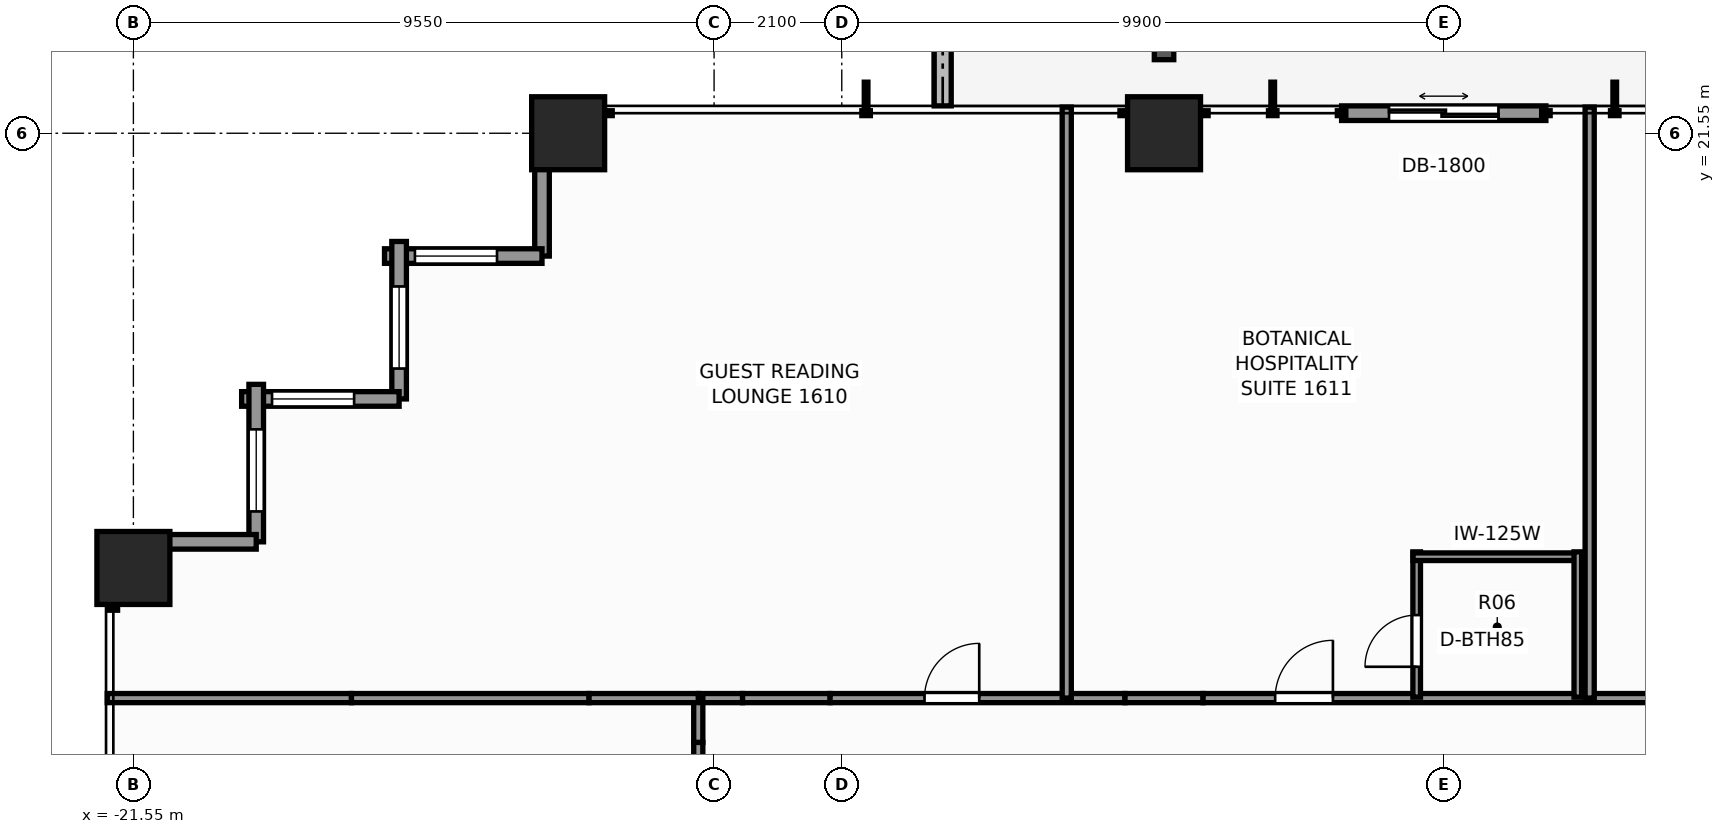
"""IFC4 building model, lengths in metres.
Left out: names, types, materials, properties, quantities, classifications, styles, units other than length and angle.
Written with IfcOpenShell. Run it as: python <this file> out.ifc"""

import sys

from ifc_helpers import new_model, si_unit, direction, frame, frame_2d, origin, origin_2d, place, context, subcontext, project, spatial, rectangle, extrude, element, fill, save


model = new_model("IFC4")
c1 = context("Model", 3, precision=1e-05, world=origin(), true_north=direction((0.0, 1.0)))
c2 = subcontext(c1, "Body", "Model", "MODEL_VIEW")
j1 = project(units=[si_unit("LENGTHUNIT", "METRE"), si_unit("PLANEANGLEUNIT", "RADIAN")], contexts=[c1])
p1 = place(None, origin())
s1 = spatial("IfcSite", under=j1, at=p1, CompositionType="ELEMENT")
p2 = place(p1, origin())
s2 = spatial("IfcBuilding", under=s1, at=p2, CompositionType="ELEMENT")
p3 = place(p2, frame((0.0, 0.0, 56.8)))
s3 = spatial("IfcBuildingStorey", under=s2, at=p3, CompositionType="ELEMENT", Elevation=56.8)
for number, where, z_axis, x_axis in (
    (1, (-14.4, 21.55, 0.0), (0.0, 0.0, 1.0), (1.0, 0.0, 0.0)),
    (2, (-4.6, 21.55, 0.0), (0.0, 0.0, 1.0), (1.0, 0.0, 0.0)),
    (3, (-21.55, 14.4, 0.0), (0.0, 0.0, 1.0), (1.0, 0.0, 0.0)),
):
    element("IfcColumn", number, at=place(p3, frame(where, z_axis=z_axis, x_axis=x_axis)), inside=s3, PredefinedType="COLUMN", context=c2, shape_type="SweptSolid", body=[
        extrude(rectangle(XDim=1.2, YDim=1.2, at=origin_2d()), origin(), (0.0, 0.0, 1.0), 3.3),
    ])
p4 = place(p3, frame((-8.24, 25.367, -0.06), z_axis=(0.0, 0.0, 1.0), x_axis=(0.0, -1.0, 0.0)))
e4 = element("IfcWall", 4, at=p4, inside=s3, PredefinedType="PARAPET", context=c2, shape_type="SweptSolid", body=[
    extrude(rectangle(XDim=3.367, YDim=0.28, at=frame_2d((1.684, 0.0))), origin(), (0.0, 0.0, 1.0), 0.42),
])
p5 = place(p3, frame((-1.68, 21.88, 0.0), z_axis=(0.0, 0.0, 1.0), x_axis=(1.0, 0.0, 0.0)))
e5 = element("IfcWall", 5, at=p5, inside=s3, PredefinedType="STANDARD", context=c2, shape_type="SweptSolid", body=[
    extrude(rectangle(XDim=3.36, YDim=0.24, at=frame_2d((1.68, 0.0))), origin(), (0.0, 0.0, 1.0), 3.06),
])
p6 = place(p5, frame((0.78, 0.0, 0.0)))
e6 = element("IfcOpeningElement", 6, at=p6, cuts=e5, PredefinedType="OPENING", context=c2, shape_type="SweptSolid", body=[
    extrude(rectangle(XDim=1.8, YDim=2.2, at=frame_2d((0.9, 1.1))), frame((0.0, 0.13, 0.0), z_axis=(0.0, -1.0, 0.0), x_axis=(1.0, 0.0, 0.0)), (0.0, 0.0, 1.0), 0.26),
])
p7 = place(p3, frame((-14.83, 19.53, 0.0), z_axis=(0.0, 0.0, 1.0), x_axis=(0.0, 1.0, 0.0)))
e7 = element("IfcWall", 7, at=p7, inside=s3, PredefinedType="STANDARD", context=c2, shape_type="SweptSolid", body=[
    extrude(rectangle(XDim=2.59, YDim=0.24, at=frame_2d((1.295, 0.0))), origin(), (0.0, 0.0, 1.0), 1.255),
])
p8 = place(p3, frame((-17.42, 19.53, 0.0), z_axis=(0.0, 0.0, 1.0), x_axis=(1.0, 0.0, 0.0)))
e8 = element("IfcWall", 8, at=p8, inside=s3, PredefinedType="STANDARD", context=c2, shape_type="SweptSolid", body=[
    extrude(rectangle(XDim=2.59, YDim=0.24, at=frame_2d((1.295, 0.0))), origin(), (0.0, 0.0, 1.0), 2.439),
])
p9 = place(p8, frame((0.5, 0.0, 0.65)))
e9 = element("IfcOpeningElement", 9, at=p9, cuts=e8, PredefinedType="OPENING", context=c2, shape_type="SweptSolid", body=[
    extrude(rectangle(XDim=1.35, YDim=1.55, at=frame_2d((0.675, 0.775))), frame((0.0, 0.13, 0.0), z_axis=(0.0, -1.0, 0.0), x_axis=(1.0, 0.0, 0.0)), (0.0, 0.0, 1.0), 0.26),
])
p10 = place(p3, frame((-17.18, 17.18, 0.0), z_axis=(0.0, 0.0, 1.0), x_axis=(0.0, 1.0, 0.0)))
e10 = element("IfcWall", 10, at=p10, inside=s3, PredefinedType="STANDARD", context=c2, shape_type="SweptSolid", body=[
    extrude(rectangle(XDim=2.59, YDim=0.24, at=frame_2d((1.295, 0.0))), origin(), (0.0, 0.0, 1.0), 2.439),
])
p11 = place(p10, frame((0.5, 0.0, 0.65)))
e11 = element("IfcOpeningElement", 11, at=p11, cuts=e10, PredefinedType="OPENING", context=c2, shape_type="SweptSolid", body=[
    extrude(rectangle(XDim=1.35, YDim=1.55, at=frame_2d((0.675, 0.775))), frame((0.0, 0.13, 0.0), z_axis=(0.0, -1.0, 0.0), x_axis=(1.0, 0.0, 0.0)), (0.0, 0.0, 1.0), 0.26),
])
p12 = place(p3, frame((-19.77, 17.18, 0.0), z_axis=(0.0, 0.0, 1.0), x_axis=(1.0, 0.0, 0.0)))
e12 = element("IfcWall", 12, at=p12, inside=s3, PredefinedType="STANDARD", context=c2, shape_type="SweptSolid", body=[
    extrude(rectangle(XDim=2.59, YDim=0.24, at=frame_2d((1.295, 0.0))), origin(), (0.0, 0.0, 1.0), 2.439),
])
p13 = place(p12, frame((0.5, 0.0, 0.65)))
e13 = element("IfcOpeningElement", 13, at=p13, cuts=e12, PredefinedType="OPENING", context=c2, shape_type="SweptSolid", body=[
    extrude(rectangle(XDim=1.35, YDim=1.55, at=frame_2d((0.675, 0.775))), frame((0.0, 0.13, 0.0), z_axis=(0.0, -1.0, 0.0), x_axis=(1.0, 0.0, 0.0)), (0.0, 0.0, 1.0), 0.26),
])
p14 = place(p3, frame((-19.53, 14.83, 0.0), z_axis=(0.0, 0.0, 1.0), x_axis=(0.0, 1.0, 0.0)))
e14 = element("IfcWall", 14, at=p14, inside=s3, PredefinedType="STANDARD", context=c2, shape_type="SweptSolid", body=[
    extrude(rectangle(XDim=2.59, YDim=0.24, at=frame_2d((1.295, 0.0))), origin(), (0.0, 0.0, 1.0), 2.439),
])
p15 = place(p14, frame((0.5, 0.0, 0.65)))
e15 = element("IfcOpeningElement", 15, at=p15, cuts=e14, PredefinedType="OPENING", context=c2, shape_type="SweptSolid", body=[
    extrude(rectangle(XDim=1.35, YDim=1.55, at=frame_2d((0.675, 0.775))), frame((0.0, 0.13, 0.0), z_axis=(0.0, -1.0, 0.0), x_axis=(1.0, 0.0, 0.0)), (0.0, 0.0, 1.0), 0.26),
])
p16 = place(p3, frame((-22.12, 14.83, 0.0), z_axis=(0.0, 0.0, 1.0), x_axis=(1.0, 0.0, 0.0)))
e16 = element("IfcWall", 16, at=p16, inside=s3, PredefinedType="STANDARD", context=c2, shape_type="SweptSolid", body=[
    extrude(rectangle(XDim=2.59, YDim=0.24, at=frame_2d((1.295, 0.0))), origin(), (0.0, 0.0, 1.0), 1.255),
])
p17 = place(p3, frame((-12.26, 12.26, 0.0), z_axis=(0.0, 0.0, 1.0), x_axis=(1.0, 0.0, 0.0)))
e17 = element("IfcWall", 17, at=p17, inside=s3, PredefinedType="PARTITIONING", context=c2, shape_type="SweptSolid", body=[
    extrude(rectangle(XDim=0.729, YDim=0.15, at=frame_2d((0.364, 0.0))), origin(), (0.0, 0.0, 1.0), 3.06),
])
p18 = place(p3, frame((-11.531, 12.26, 0.0), z_axis=(0.0, 0.0, 1.0), x_axis=(1.0, 0.0, 0.0)))
e18 = element("IfcWall", 18, at=p18, inside=s3, PredefinedType="PARTITIONING", context=c2, shape_type="SweptSolid", body=[
    extrude(rectangle(XDim=1.439, YDim=0.15, at=frame_2d((0.72, 0.0))), origin(), (0.0, 0.0, 1.0), 1.245),
])
p19 = place(p3, frame((-10.092, 12.26, 0.0), z_axis=(0.0, 0.0, 1.0), x_axis=(1.0, 0.0, 0.0)))
e19 = element("IfcWall", 19, at=p19, inside=s3, PredefinedType="PARTITIONING", context=c2, shape_type="SweptSolid", body=[
    extrude(rectangle(XDim=4.85, YDim=0.15, at=frame_2d((2.425, 0.0))), origin(), (0.0, 0.0, 1.0), 3.06),
])
p20 = place(p19, frame((1.552, 0.0, 0.0)))
e20 = element("IfcOpeningElement", 20, at=p20, cuts=e19, PredefinedType="OPENING", context=c2, shape_type="SweptSolid", body=[
    extrude(rectangle(XDim=0.9, YDim=2.06, at=frame_2d((0.45, 1.03))), frame((0.0, 0.085, 0.0), z_axis=(0.0, -1.0, 0.0), x_axis=(1.0, 0.0, 0.0)), (0.0, 0.0, 1.0), 0.17),
])
p21 = place(p3, frame((-5.242, 12.26, 0.0), z_axis=(0.0, 0.0, 1.0), x_axis=(1.0, 0.0, 0.0)))
e21 = element("IfcWall", 21, at=p21, inside=s3, PredefinedType="PARTITIONING", context=c2, shape_type="SweptSolid", body=[
    extrude(rectangle(XDim=1.284, YDim=0.15, at=frame_2d((0.642, 0.0))), origin(), (0.0, 0.0, 1.0), 1.245),
])
p22 = place(p3, frame((-3.958, 12.26, 0.0), z_axis=(0.0, 0.0, 1.0), x_axis=(1.0, 0.0, 0.0)))
e22 = element("IfcWall", 22, at=p22, inside=s3, PredefinedType="PARTITIONING", context=c2, shape_type="SweptSolid", body=[
    extrude(rectangle(XDim=7.916, YDim=0.15, at=frame_2d((3.958, 0.0))), origin(), (0.0, 0.0, 1.0), 2.585),
])
p23 = place(p22, frame((1.186, 0.0, 0.0)))
e23 = element("IfcOpeningElement", 23, at=p23, cuts=e22, PredefinedType="OPENING", context=c2, shape_type="SweptSolid", body=[
    extrude(rectangle(XDim=0.95, YDim=2.06, at=frame_2d((0.475, 1.03))), frame((0.0, 0.085, 0.0), z_axis=(0.0, -1.0, 0.0), x_axis=(1.0, 0.0, 0.0)), (0.0, 0.0, 1.0), 0.17),
])
p24 = place(p3, frame((-12.26, 10.092, 0.0), z_axis=(0.0, 0.0, 1.0), x_axis=(0.0, 1.0, 0.0)))
e24 = element("IfcWall", 24, at=p24, inside=s3, PredefinedType="PARTITIONING", context=c2, shape_type="SweptSolid", body=[
    extrude(rectangle(XDim=1.439, YDim=0.15, at=frame_2d((0.72, 0.0))), origin(), (0.0, 0.0, 1.0), 1.245),
])
p25 = place(p3, frame((-12.26, 11.531, 0.0), z_axis=(0.0, 0.0, 1.0), x_axis=(0.0, 1.0, 0.0)))
e25 = element("IfcWall", 25, at=p25, inside=s3, PredefinedType="PARTITIONING", context=c2, shape_type="SweptSolid", body=[
    extrude(rectangle(XDim=0.729, YDim=0.15, at=frame_2d((0.364, 0.0))), origin(), (0.0, 0.0, 1.0), 3.06),
])
p26 = place(p3, frame((-21.98, 12.26, 0.0), z_axis=(0.0, 0.0, 1.0), x_axis=(1.0, 0.0, 0.0)))
e26 = element("IfcWall", 26, at=p26, inside=s3, PredefinedType="PARTITIONING", context=c2, shape_type="SweptSolid", body=[
    extrude(rectangle(XDim=4.017, YDim=0.15, at=frame_2d((2.008, 0.0))), origin(), (0.0, 0.0, 1.0), 2.429),
])
p27 = place(p3, frame((-17.963, 12.26, 0.0), z_axis=(0.0, 0.0, 1.0), x_axis=(1.0, 0.0, 0.0)))
e27 = element("IfcWall", 27, at=p27, inside=s3, PredefinedType="PARTITIONING", context=c2, shape_type="SweptSolid", body=[
    extrude(rectangle(XDim=3.907, YDim=0.15, at=frame_2d((1.954, 0.0))), origin(), (0.0, 0.0, 1.0), 1.245),
])
p28 = place(p3, frame((-14.056, 12.26, 0.0), z_axis=(0.0, 0.0, 1.0), x_axis=(1.0, 0.0, 0.0)))
e28 = element("IfcWall", 28, at=p28, inside=s3, PredefinedType="PARTITIONING", context=c2, shape_type="SweptSolid", body=[
    extrude(rectangle(XDim=1.796, YDim=0.15, at=frame_2d((0.898, 0.0))), origin(), (0.0, 0.0, 1.0), 3.06),
])
for number, where, z_axis, x_axis in (
    (29, (-6.2, 12.26, 0.0), (0.0, 0.0, 1.0), (0.0, 1.0, 0.0)),
    (30, (2.4, 12.26, 0.0), (0.0, 0.0, 1.0), (0.0, 1.0, 0.0)),
):
    element("IfcWall", number, at=place(p3, frame(where, z_axis=z_axis, x_axis=x_axis)), inside=s3, PredefinedType="PARTITIONING", context=c2, shape_type="SweptSolid", body=[
        extrude(rectangle(XDim=9.72, YDim=0.15, at=frame_2d((4.86, 0.0))), origin(), (0.0, 0.0, 1.0), 2.429),
    ])
p29 = place(p3, frame((-0.445, 12.275, 0.0), z_axis=(0.0, 0.0, 1.0), x_axis=(0.0, 1.0, 0.0)))
e31 = element("IfcWall", 31, at=p29, inside=s3, PredefinedType="PARTITIONING", context=c2, shape_type="SweptSolid", body=[
    extrude(rectangle(XDim=2.39, YDim=0.125, at=frame_2d((1.195, 0.0))), origin(), (0.0, 0.0, 1.0), 3.06),
])
p30 = place(p29, frame((0.5, 0.0, 0.0)))
e32 = element("IfcOpeningElement", 32, at=p30, cuts=e31, PredefinedType="OPENING", context=c2, shape_type="SweptSolid", body=[
    extrude(rectangle(XDim=0.85, YDim=2.03, at=frame_2d((0.425, 1.015))), frame((0.0, 0.073, 0.0), z_axis=(0.0, -1.0, 0.0), x_axis=(1.0, 0.0, 0.0)), (0.0, 0.0, 1.0), 0.145),
])
p31 = place(p3, frame((-0.505, 14.585, 0.0), z_axis=(0.0, 0.0, 1.0), x_axis=(1.0, 0.0, 0.0)))
e33 = element("IfcWall", 33, at=p31, inside=s3, PredefinedType="PARTITIONING", context=c2, shape_type="SweptSolid", body=[
    extrude(rectangle(XDim=2.77, YDim=0.125, at=frame_2d((1.385, 0.0))), origin(), (0.0, 0.0, 1.0), 2.585),
])
p32 = place(p3, frame((2.205, 12.275, 0.0), z_axis=(0.0, 0.0, 1.0), x_axis=(0.0, 1.0, 0.0)))
e34 = element("IfcWall", 34, at=p32, inside=s3, PredefinedType="PARTITIONING", context=c2, shape_type="SweptSolid", body=[
    extrude(rectangle(XDim=2.39, YDim=0.125, at=frame_2d((1.195, 0.0))), origin(), (0.0, 0.0, 1.0), 3.06),
])
p33 = place(p6, origin())
e35 = element("IfcDoor", 35, at=p33, inside=s3, OperationType="DOUBLE_DOOR_SLIDING", PredefinedType="DOOR", context=c2, shape_type="SweptSolid", body=[
    extrude(rectangle(XDim=1.8, YDim=2.2, at=frame_2d((0.9, 1.1))), frame((0.0, 0.025, 0.0), z_axis=(0.0, -1.0, 0.0), x_axis=(1.0, 0.0, 0.0)), (0.0, 0.0, 1.0), 0.05),
])
fill(e6, e35)
p34 = place(p9, origin())
e36 = element("IfcWindow", 36, at=p34, inside=s3, PartitioningType="SINGLE_PANEL", PredefinedType="WINDOW", context=c2, shape_type="SweptSolid", body=[
    extrude(rectangle(XDim=1.35, YDim=1.55, at=frame_2d((0.675, 0.775))), frame((0.0, 0.03, 0.0), z_axis=(0.0, -1.0, 0.0), x_axis=(1.0, 0.0, 0.0)), (0.0, 0.0, 1.0), 0.06),
])
fill(e9, e36)
p35 = place(p11, origin())
e37 = element("IfcWindow", 37, at=p35, inside=s3, PartitioningType="SINGLE_PANEL", PredefinedType="WINDOW", context=c2, shape_type="SweptSolid", body=[
    extrude(rectangle(XDim=1.35, YDim=1.55, at=frame_2d((0.675, 0.775))), frame((0.0, 0.03, 0.0), z_axis=(0.0, -1.0, 0.0), x_axis=(1.0, 0.0, 0.0)), (0.0, 0.0, 1.0), 0.06),
])
fill(e11, e37)
p36 = place(p13, origin())
e38 = element("IfcWindow", 38, at=p36, inside=s3, PartitioningType="SINGLE_PANEL", PredefinedType="WINDOW", context=c2, shape_type="SweptSolid", body=[
    extrude(rectangle(XDim=1.35, YDim=1.55, at=frame_2d((0.675, 0.775))), frame((0.0, 0.03, 0.0), z_axis=(0.0, -1.0, 0.0), x_axis=(1.0, 0.0, 0.0)), (0.0, 0.0, 1.0), 0.06),
])
fill(e13, e38)
p37 = place(p15, origin())
e39 = element("IfcWindow", 39, at=p37, inside=s3, PartitioningType="SINGLE_PANEL", PredefinedType="WINDOW", context=c2, shape_type="SweptSolid", body=[
    extrude(rectangle(XDim=1.35, YDim=1.55, at=frame_2d((0.675, 0.775))), frame((0.0, 0.03, 0.0), z_axis=(0.0, -1.0, 0.0), x_axis=(1.0, 0.0, 0.0)), (0.0, 0.0, 1.0), 0.06),
])
fill(e15, e39)
p38 = place(p20, origin())
e40 = element("IfcDoor", 40, at=p38, inside=s3, OperationType="SINGLE_SWING_RIGHT", PredefinedType="DOOR", context=c2, shape_type="SweptSolid", body=[
    extrude(rectangle(XDim=0.9, YDim=2.06, at=frame_2d((0.45, 1.03))), frame((0.0, 0.025, 0.0), z_axis=(0.0, -1.0, 0.0), x_axis=(1.0, 0.0, 0.0)), (0.0, 0.0, 1.0), 0.05),
])
fill(e20, e40)
p39 = place(p30, origin())
e41 = element("IfcDoor", 41, at=p39, inside=s3, OperationType="SINGLE_SWING_LEFT", PredefinedType="DOOR", context=c2, shape_type="SweptSolid", body=[
    extrude(rectangle(XDim=0.85, YDim=2.03, at=frame_2d((0.425, 1.015))), frame((0.0, 0.025, 0.0), z_axis=(0.0, -1.0, 0.0), x_axis=(1.0, 0.0, 0.0)), (0.0, 0.0, 1.0), 0.05),
])
fill(e32, e41)
p40 = place(p23, origin())
e42 = element("IfcDoor", 42, at=p40, inside=s3, OperationType="SINGLE_SWING_RIGHT", PredefinedType="DOOR", context=c2, shape_type="SweptSolid", body=[
    extrude(rectangle(XDim=0.95, YDim=2.06, at=frame_2d((0.475, 1.03))), frame((0.0, 0.025, 0.0), z_axis=(0.0, -1.0, 0.0), x_axis=(1.0, 0.0, 0.0)), (0.0, 0.0, 1.0), 0.05),
])
fill(e23, e42)
save(model, sys.argv[1])
